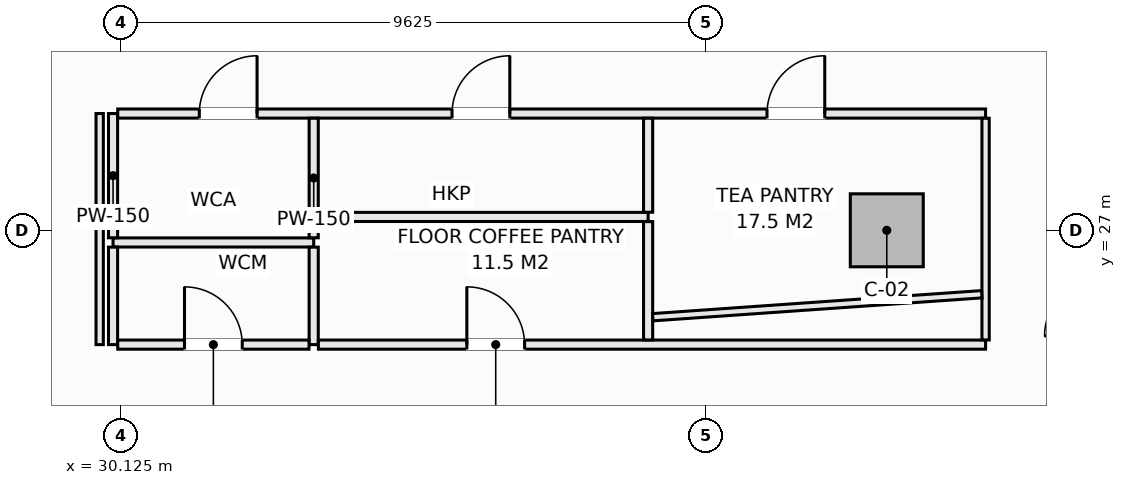
"""IFC4 building model, lengths in metres.
Left out: names, types, materials, properties, quantities, classifications, styles, units other than length and angle.
Written with IfcOpenShell. Run it as: python <this file> out.ifc"""

import sys

from ifc_helpers import new_model, si_unit, direction, frame, frame_2d, origin, origin_2d, place, context, subcontext, project, spatial, rectangle, extrude, element, fill, save


model = new_model("IFC4")
c1 = context("Model", 3, precision=1e-05, world=origin(), true_north=direction((0.0, 1.0)))
c2 = subcontext(c1, "Body", "Model", "MODEL_VIEW")
j1 = project(units=[si_unit("LENGTHUNIT", "METRE"), si_unit("PLANEANGLEUNIT", "RADIAN")], contexts=[c1])
p1 = place(None, origin())
s1 = spatial("IfcSite", under=j1, at=p1, CompositionType="ELEMENT")
p2 = place(p1, origin())
s2 = spatial("IfcBuilding", under=s1, at=p2, CompositionType="ELEMENT")
p3 = place(p2, frame((0.0, 0.0, 34.2)))
s3 = spatial("IfcBuildingStorey", under=s2, at=p3, CompositionType="ELEMENT", Elevation=34.2)
p4 = place(p3, frame((42.725, 27.0, -0.28), z_axis=(0.0, 0.0, 1.0), x_axis=(1.0, 0.0, 0.0)))
e1 = element("IfcColumn", 1, at=p4, inside=s3, PredefinedType="COLUMN", context=c2, shape_type="SweptSolid", body=[
    extrude(rectangle(XDim=1.2, YDim=1.2, at=origin_2d()), origin(), (0.0, 0.0, 1.0), 3.85),
])
p5 = place(p3, frame((30.0, 26.8, 0.0), z_axis=(0.0, 0.0, 1.0), x_axis=(1.0, 0.0, 0.0)))
e2 = element("IfcWall", 2, at=p5, inside=s3, PredefinedType="PARTITIONING", context=c2, shape_type="SweptSolid", body=[
    extrude(rectangle(XDim=3.3, YDim=0.15, at=frame_2d((1.65, 0.0))), origin(), (0.0, 0.0, 1.0), 3.57),
])
p6 = place(p3, frame((30.0, 25.12, 0.0), z_axis=(0.0, 0.0, 1.0), x_axis=(0.0, 1.0, 0.0)))
e3 = element("IfcWall", 3, at=p6, inside=s3, PredefinedType="PARTITIONING", context=c2, shape_type="SweptSolid", body=[
    extrude(rectangle(XDim=1.603, YDim=0.15, at=frame_2d((0.801, 0.0))), origin(), (0.0, 0.0, 1.0), 3.57),
])
p7 = place(p3, frame((30.0, 26.877, 0.0), z_axis=(0.0, 0.0, 1.0), x_axis=(0.0, 1.0, 0.0)))
e4 = element("IfcWall", 4, at=p7, inside=s3, PredefinedType="PARTITIONING", context=c2, shape_type="SweptSolid", body=[
    extrude(rectangle(XDim=2.043, YDim=0.15, at=frame_2d((1.021, 0.0))), origin(), (0.0, 0.0, 1.0), 3.57),
])
p8 = place(p3, frame((30.077, 28.92, 0.0), z_axis=(0.0, 0.0, 1.0), x_axis=(1.0, 0.0, 0.0)))
e5 = element("IfcWall", 5, at=p8, inside=s3, PredefinedType="PARTITIONING", context=c2, shape_type="SweptSolid", body=[
    extrude(rectangle(XDim=14.273, YDim=0.15, at=frame_2d((7.137, 0.0))), origin(), (0.0, 0.0, 1.0), 3.57),
])
p9 = place(p8, frame((1.342, 0.0, 0.0)))
e6 = element("IfcOpeningElement", 6, at=p9, cuts=e5, PredefinedType="OPENING", context=c2, shape_type="SweptSolid", body=[
    extrude(rectangle(XDim=0.95, YDim=2.1, at=frame_2d((0.475, 1.05))), frame((0.0, 0.085, 0.0), z_axis=(0.0, -1.0, 0.0), x_axis=(1.0, 0.0, 0.0)), (0.0, 0.0, 1.0), 0.17),
])
p10 = place(p8, frame((5.498, 0.0, 0.0)))
e7 = element("IfcOpeningElement", 7, at=p10, cuts=e5, PredefinedType="OPENING", context=c2, shape_type="SweptSolid", body=[
    extrude(rectangle(XDim=0.95, YDim=2.1, at=frame_2d((0.475, 1.05))), frame((0.0, 0.085, 0.0), z_axis=(0.0, -1.0, 0.0), x_axis=(1.0, 0.0, 0.0)), (0.0, 0.0, 1.0), 0.17),
])
p11 = place(p8, frame((10.678, 0.0, 0.0)))
e8 = element("IfcOpeningElement", 8, at=p11, cuts=e5, PredefinedType="OPENING", context=c2, shape_type="SweptSolid", body=[
    extrude(rectangle(XDim=0.95, YDim=2.1, at=frame_2d((0.475, 1.05))), frame((0.0, 0.085, 0.0), z_axis=(0.0, -1.0, 0.0), x_axis=(1.0, 0.0, 0.0)), (0.0, 0.0, 1.0), 0.17),
])
p12 = place(p3, frame((33.3, 25.12, 0.0), z_axis=(0.0, 0.0, 1.0), x_axis=(0.0, 1.0, 0.0)))
e9 = element("IfcWall", 9, at=p12, inside=s3, PredefinedType="PARTITIONING", context=c2, shape_type="SweptSolid", body=[
    extrude(rectangle(XDim=1.603, YDim=0.15, at=frame_2d((0.801, 0.0))), origin(), (0.0, 0.0, 1.0), 3.57),
])
p13 = place(p3, frame((33.3, 26.877, 0.0), z_axis=(0.0, 0.0, 1.0), x_axis=(0.0, 1.0, 0.0)))
e10 = element("IfcWall", 10, at=p13, inside=s3, PredefinedType="PARTITIONING", context=c2, shape_type="SweptSolid", body=[
    extrude(rectangle(XDim=1.966, YDim=0.15, at=frame_2d((0.983, 0.0))), origin(), (0.0, 0.0, 1.0), 3.57),
])
p14 = place(p3, frame((30.077, 25.12, 0.0), z_axis=(0.0, 0.0, 1.0), x_axis=(1.0, 0.0, 0.0)))
e11 = element("IfcWall", 11, at=p14, inside=s3, PredefinedType="PARTITIONING", context=c2, shape_type="SweptSolid", body=[
    extrude(rectangle(XDim=3.146, YDim=0.15, at=frame_2d((1.573, 0.0))), origin(), (0.0, 0.0, 1.0), 3.57),
])
p15 = place(p14, frame((1.098, 0.0, 0.0)))
e12 = element("IfcOpeningElement", 12, at=p15, cuts=e11, PredefinedType="OPENING", context=c2, shape_type="SweptSolid", body=[
    extrude(rectangle(XDim=0.95, YDim=2.1, at=frame_2d((0.475, 1.05))), frame((0.0, 0.085, 0.0), z_axis=(0.0, -1.0, 0.0), x_axis=(1.0, 0.0, 0.0)), (0.0, 0.0, 1.0), 0.17),
])
p16 = place(p3, frame((33.377, 25.12, 0.0), z_axis=(0.0, 0.0, 1.0), x_axis=(1.0, 0.0, 0.0)))
e13 = element("IfcWall", 13, at=p16, inside=s3, PredefinedType="PARTITIONING", context=c2, shape_type="SweptSolid", body=[
    extrude(rectangle(XDim=10.973, YDim=0.15, at=frame_2d((5.487, 0.0))), origin(), (0.0, 0.0, 1.0), 3.57),
])
p17 = place(p16, frame((2.441, 0.0, 0.0)))
e14 = element("IfcOpeningElement", 14, at=p17, cuts=e13, PredefinedType="OPENING", context=c2, shape_type="SweptSolid", body=[
    extrude(rectangle(XDim=0.95, YDim=2.1, at=frame_2d((0.475, 1.05))), frame((0.0, 0.085, 0.0), z_axis=(0.0, -1.0, 0.0), x_axis=(1.0, 0.0, 0.0)), (0.0, 0.0, 1.0), 0.17),
])
p18 = place(p3, frame((33.377, 27.22, 0.0), z_axis=(0.0, 0.0, 1.0), x_axis=(1.0, 0.0, 0.0)))
e15 = element("IfcWall", 15, at=p18, inside=s3, PredefinedType="PARTITIONING", context=c2, shape_type="SweptSolid", body=[
    extrude(rectangle(XDim=5.423, YDim=0.15, at=frame_2d((2.711, 0.0))), origin(), (0.0, 0.0, 1.0), 3.57),
])
p19 = place(p3, frame((38.8, 25.197, 0.0), z_axis=(0.0, 0.0, 1.0), x_axis=(0.0, 1.0, 0.0)))
e16 = element("IfcWall", 16, at=p19, inside=s3, PredefinedType="PARTITIONING", context=c2, shape_type="SweptSolid", body=[
    extrude(rectangle(XDim=1.946, YDim=0.15, at=frame_2d((0.973, 0.0))), origin(), (0.0, 0.0, 1.0), 3.57),
])
p20 = place(p3, frame((38.8, 27.297, 0.0), z_axis=(0.0, 0.0, 1.0), x_axis=(0.0, 1.0, 0.0)))
e17 = element("IfcWall", 17, at=p20, inside=s3, PredefinedType="PARTITIONING", context=c2, shape_type="SweptSolid", body=[
    extrude(rectangle(XDim=1.546, YDim=0.15, at=frame_2d((0.773, 0.0))), origin(), (0.0, 0.0, 1.0), 3.57),
])
p21 = place(p3, frame((29.78, 25.12, 0.0), z_axis=(0.0, 0.0, 1.0), x_axis=(0.0, 1.0, 0.0)))
e18 = element("IfcWall", 18, at=p21, inside=s3, PredefinedType="PARTITIONING", context=c2, shape_type="SweptSolid", body=[
    extrude(rectangle(XDim=3.8, YDim=0.12, at=frame_2d((1.9, 0.0))), origin(), (0.0, 0.0, 1.0), 3.57),
])
p22 = place(p3, frame((44.35, 25.197, 0.0), z_axis=(0.0, 0.0, 1.0), x_axis=(0.0, 1.0, 0.0)))
e19 = element("IfcWall", 19, at=p22, inside=s3, PredefinedType="PARTITIONING", context=c2, shape_type="SweptSolid", body=[
    extrude(rectangle(XDim=3.646, YDim=0.12, at=frame_2d((1.823, 0.0))), origin(), (0.0, 0.0, 1.0), 3.57),
])
p23 = place(p3, frame((38.877, 25.57, 0.0), z_axis=(0.0, 0.0, 1.0), x_axis=(0.997563605061, 0.069762840094, 0.0)))
e20 = element("IfcWall", 20, at=p23, inside=s3, PredefinedType="PARTITIONING", context=c2, shape_type="SweptSolid", body=[
    extrude(rectangle(XDim=5.424, YDim=0.12, at=frame_2d((2.712, 0.0))), origin(), (0.0, 0.0, 1.0), 3.57),
])
p24 = place(p9, origin())
e21 = element("IfcDoor", 21, at=p24, inside=s3, OperationType="SINGLE_SWING_RIGHT", PredefinedType="DOOR", context=c2, shape_type="SweptSolid", body=[
    extrude(rectangle(XDim=0.95, YDim=2.1, at=frame_2d((0.475, 1.05))), frame((0.0, 0.025, 0.0), z_axis=(0.0, -1.0, 0.0), x_axis=(1.0, 0.0, 0.0)), (0.0, 0.0, 1.0), 0.05),
])
fill(e6, e21)
p25 = place(p15, origin())
e22 = element("IfcDoor", 22, at=p25, inside=s3, OperationType="SINGLE_SWING_LEFT", PredefinedType="DOOR", context=c2, shape_type="SweptSolid", body=[
    extrude(rectangle(XDim=0.95, YDim=2.1, at=frame_2d((0.475, 1.05))), frame((0.0, 0.025, 0.0), z_axis=(0.0, -1.0, 0.0), x_axis=(1.0, 0.0, 0.0)), (0.0, 0.0, 1.0), 0.05),
])
fill(e12, e22)
p26 = place(p10, origin())
e23 = element("IfcDoor", 23, at=p26, inside=s3, OperationType="SINGLE_SWING_RIGHT", PredefinedType="DOOR", context=c2, shape_type="SweptSolid", body=[
    extrude(rectangle(XDim=0.95, YDim=2.1, at=frame_2d((0.475, 1.05))), frame((0.0, 0.025, 0.0), z_axis=(0.0, -1.0, 0.0), x_axis=(1.0, 0.0, 0.0)), (0.0, 0.0, 1.0), 0.05),
])
fill(e7, e23)
p27 = place(p17, origin())
e24 = element("IfcDoor", 24, at=p27, inside=s3, OperationType="SINGLE_SWING_LEFT", PredefinedType="DOOR", context=c2, shape_type="SweptSolid", body=[
    extrude(rectangle(XDim=0.95, YDim=2.1, at=frame_2d((0.475, 1.05))), frame((0.0, 0.025, 0.0), z_axis=(0.0, -1.0, 0.0), x_axis=(1.0, 0.0, 0.0)), (0.0, 0.0, 1.0), 0.05),
])
fill(e14, e24)
p28 = place(p11, origin())
e25 = element("IfcDoor", 25, at=p28, inside=s3, OperationType="SINGLE_SWING_RIGHT", PredefinedType="DOOR", context=c2, shape_type="SweptSolid", body=[
    extrude(rectangle(XDim=0.95, YDim=2.1, at=frame_2d((0.475, 1.05))), frame((0.0, 0.025, 0.0), z_axis=(0.0, -1.0, 0.0), x_axis=(1.0, 0.0, 0.0)), (0.0, 0.0, 1.0), 0.05),
])
fill(e8, e25)
save(model, sys.argv[1])
